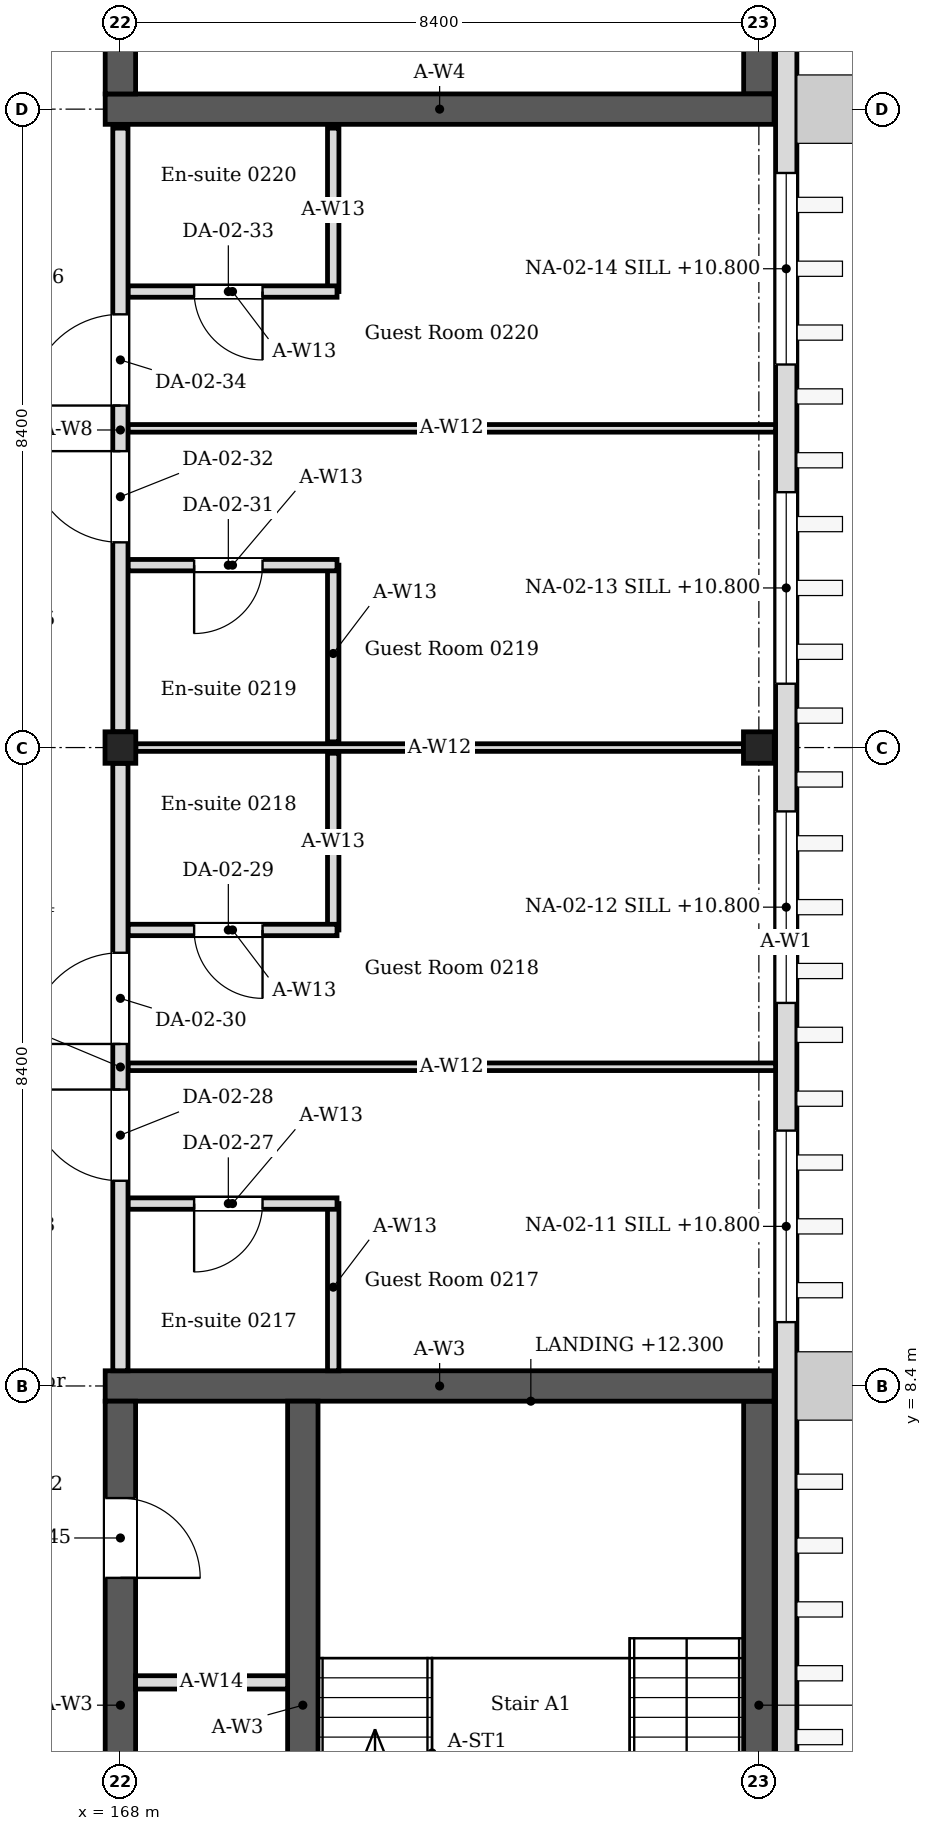
"""IFC4 building model, lengths in metres.
Left out: names, types, materials, properties, quantities, classifications, styles, units other than length and angle.
Written with IfcOpenShell. Run it as: python <this file> out.ifc"""

import sys

from ifc_helpers import new_model, si_unit, direction, frame, frame_2d, origin, origin_2d, place, context, subcontext, project, spatial, rectangle, i_section, extrude, element, fill, save


model = new_model("IFC4")
c1 = context("Model", 3, precision=1e-05, world=origin(), true_north=direction((0.0, 1.0)))
c2 = subcontext(c1, "Body", "Model", "MODEL_VIEW")
j1 = project(units=[si_unit("LENGTHUNIT", "METRE"), si_unit("PLANEANGLEUNIT", "RADIAN")], contexts=[c1])
p1 = place(None, origin())
s1 = spatial("IfcSite", under=j1, at=p1, CompositionType="ELEMENT")
p2 = place(p1, origin())
s2 = spatial("IfcBuilding", under=s1, at=p2, CompositionType="ELEMENT")
p3 = place(p2, frame((0.0, 0.0, 10.2)))
s3 = spatial("IfcBuildingStorey", under=s2, at=p3, CompositionType="ELEMENT", Elevation=10.2)
for number, where, z_axis, x_axis in (
    (1, (168.0, 16.8, 0.0), (0.0, 0.0, 1.0), (1.0, 0.0, 0.0)),
    (2, (176.4, 16.8, 0.0), (0.0, 0.0, 1.0), (1.0, 0.0, 0.0)),
):
    element("IfcColumn", number, at=place(p3, frame(where, z_axis=z_axis, x_axis=x_axis)), inside=s3, PredefinedType="COLUMN", context=c2, shape_type="SweptSolid", body=[
        extrude(i_section(OverallWidth=0.405, OverallDepth=0.414, WebThickness=0.018, FlangeThickness=0.028, FilletRadius=0.022, at=origin_2d()), origin(), (0.0, 0.0, 1.0), 4.2),
    ])
p4 = place(p3, frame((167.8, 8.4, 0.0), z_axis=(0.0, 0.0, 1.0), x_axis=(1.0, 0.0, 0.0)))
e3 = element("IfcWall", 3, at=p4, inside=s3, PredefinedType="SOLIDWALL", context=c2, shape_type="SweptSolid", body=[
    extrude(rectangle(XDim=8.8, YDim=0.4, at=frame_2d((4.4, 0.0))), origin(), (0.0, 0.0, 1.0), 4.05),
])
p5 = place(p3, frame((168.0, 0.2, 0.0), z_axis=(0.0, 0.0, 1.0), x_axis=(0.0, 1.0, 0.0)))
e4 = element("IfcWall", 4, at=p5, inside=s3, PredefinedType="SOLIDWALL", context=c2, shape_type="SweptSolid", body=[
    extrude(rectangle(XDim=8.0, YDim=0.4, at=frame_2d((4.0, 0.0))), origin(), (0.0, 0.0, 1.0), 4.05),
])
p6 = place(p5, frame((1.75, 0.0, 0.0)))
e5 = element("IfcOpeningElement", 5, at=p6, cuts=e4, PredefinedType="OPENING", context=c2, shape_type="SweptSolid", body=[
    extrude(rectangle(XDim=1.0, YDim=2.1, at=frame_2d((0.5, 1.05))), frame((0.0, 0.21, 0.0), z_axis=(0.0, -1.0, 0.0), x_axis=(1.0, 0.0, 0.0)), (0.0, 0.0, 1.0), 0.42),
])
p7 = place(p5, frame((5.675, 0.0, 0.0)))
e6 = element("IfcOpeningElement", 6, at=p7, cuts=e4, PredefinedType="OPENING", context=c2, shape_type="SweptSolid", body=[
    extrude(rectangle(XDim=1.05, YDim=2.1, at=frame_2d((0.525, 1.05))), frame((0.0, 0.21, 0.0), z_axis=(0.0, -1.0, 0.0), x_axis=(1.0, 0.0, 0.0)), (0.0, 0.0, 1.0), 0.42),
])
p8 = place(p3, frame((176.4, 0.2, 0.0), z_axis=(0.0, 0.0, 1.0), x_axis=(0.0, 1.0, 0.0)))
e7 = element("IfcWall", 7, at=p8, inside=s3, PredefinedType="SOLIDWALL", context=c2, shape_type="SweptSolid", body=[
    extrude(rectangle(XDim=8.0, YDim=0.4, at=frame_2d((4.0, 0.0))), origin(), (0.0, 0.0, 1.0), 4.05),
])
p9 = place(p3, frame((167.8, 25.2, 0.0), z_axis=(0.0, 0.0, 1.0), x_axis=(1.0, 0.0, 0.0)))
e8 = element("IfcWall", 8, at=p9, inside=s3, PredefinedType="SOLIDWALL", context=c2, shape_type="SweptSolid", body=[
    extrude(rectangle(XDim=8.8, YDim=0.4, at=frame_2d((4.4, 0.0))), origin(), (0.0, 0.0, 1.0), 4.05),
])
p10 = place(p3, frame((168.0, 25.4, 0.0), z_axis=(0.0, 0.0, 1.0), x_axis=(0.0, 1.0, 0.0)))
e9 = element("IfcWall", 9, at=p10, inside=s3, PredefinedType="SOLIDWALL", context=c2, shape_type="SweptSolid", body=[
    extrude(rectangle(XDim=16.4, YDim=0.4, at=frame_2d((8.2, 0.0))), origin(), (0.0, 0.0, 1.0), 4.05),
])
p11 = place(p10, frame((1.0, 0.0, 0.0)))
e10 = element("IfcOpeningElement", 10, at=p11, cuts=e9, PredefinedType="OPENING", context=c2, shape_type="SweptSolid", body=[
    extrude(rectangle(XDim=1.0, YDim=2.1, at=frame_2d((0.5, 1.05))), frame((0.0, 0.21, 0.0), z_axis=(0.0, -1.0, 0.0), x_axis=(1.0, 0.0, 0.0)), (0.0, 0.0, 1.0), 0.42),
])
p12 = place(p10, frame((14.4, 0.0, 0.0)))
e11 = element("IfcOpeningElement", 11, at=p12, cuts=e9, PredefinedType="OPENING", context=c2, shape_type="SweptSolid", body=[
    extrude(rectangle(XDim=1.4, YDim=2.1, at=frame_2d((0.7, 1.05))), frame((0.0, 0.21, 0.0), z_axis=(0.0, -1.0, 0.0), x_axis=(1.0, 0.0, 0.0)), (0.0, 0.0, 1.0), 0.42),
])
p13 = place(p3, frame((176.4, 25.4, 0.0), z_axis=(0.0, 0.0, 1.0), x_axis=(0.0, 1.0, 0.0)))
e12 = element("IfcWall", 12, at=p13, inside=s3, PredefinedType="SOLIDWALL", context=c2, shape_type="SweptSolid", body=[
    extrude(rectangle(XDim=16.4, YDim=0.4, at=frame_2d((8.2, 0.0))), origin(), (0.0, 0.0, 1.0), 4.05),
])
p14 = place(p3, frame((176.76, -0.22, 0.0), z_axis=(0.0, 0.0, 1.0), x_axis=(0.0, 1.0, 0.0)))
e13 = element("IfcWall", 13, at=p14, inside=s3, PredefinedType="SOLIDWALL", context=c2, shape_type="SweptSolid", body=[
    extrude(rectangle(XDim=42.57, YDim=0.28, at=frame_2d((21.285, 0.0))), origin(), (0.0, 0.0, 1.0), 4.05),
])
p15 = place(p14, frame((9.46, 0.0, 0.6)))
e14 = element("IfcOpeningElement", 14, at=p15, cuts=e13, PredefinedType="OPENING", context=c2, shape_type="SweptSolid", body=[
    extrude(rectangle(XDim=2.52, YDim=2.4, at=frame_2d((1.26, 1.2))), frame((0.0, 0.15, 0.0), z_axis=(0.0, -1.0, 0.0), x_axis=(1.0, 0.0, 0.0)), (0.0, 0.0, 1.0), 0.3),
])
p16 = place(p14, frame((13.66, 0.0, 0.6)))
e15 = element("IfcOpeningElement", 15, at=p16, cuts=e13, PredefinedType="OPENING", context=c2, shape_type="SweptSolid", body=[
    extrude(rectangle(XDim=2.52, YDim=2.4, at=frame_2d((1.26, 1.2))), frame((0.0, 0.15, 0.0), z_axis=(0.0, -1.0, 0.0), x_axis=(1.0, 0.0, 0.0)), (0.0, 0.0, 1.0), 0.3),
])
p17 = place(p14, frame((17.86, 0.0, 0.6)))
e16 = element("IfcOpeningElement", 16, at=p17, cuts=e13, PredefinedType="OPENING", context=c2, shape_type="SweptSolid", body=[
    extrude(rectangle(XDim=2.52, YDim=2.4, at=frame_2d((1.26, 1.2))), frame((0.0, 0.15, 0.0), z_axis=(0.0, -1.0, 0.0), x_axis=(1.0, 0.0, 0.0)), (0.0, 0.0, 1.0), 0.3),
])
p18 = place(p14, frame((22.06, 0.0, 0.6)))
e17 = element("IfcOpeningElement", 17, at=p18, cuts=e13, PredefinedType="OPENING", context=c2, shape_type="SweptSolid", body=[
    extrude(rectangle(XDim=2.52, YDim=2.4, at=frame_2d((1.26, 1.2))), frame((0.0, 0.15, 0.0), z_axis=(0.0, -1.0, 0.0), x_axis=(1.0, 0.0, 0.0)), (0.0, 0.0, 1.0), 0.3),
])
p19 = place(p3, frame((170.8, 8.6, 0.0), z_axis=(0.0, 0.0, 1.0), x_axis=(0.0, 1.0, 0.0)))
e18 = element("IfcWall", 18, at=p19, inside=s3, PredefinedType="PARTITIONING", context=c2, shape_type="SweptSolid", body=[
    extrude(rectangle(XDim=2.2, YDim=0.15, at=frame_2d((1.1, 0.0))), origin(), (0.0, 0.0, 1.0), 4.05),
])
p20 = place(p3, frame((170.85, 10.8, 0.0), z_axis=(0.0, 0.0, 1.0), x_axis=(-1.0, 0.0, 0.0)))
e19 = element("IfcWall", 19, at=p20, inside=s3, PredefinedType="PARTITIONING", context=c2, shape_type="SweptSolid", body=[
    extrude(rectangle(XDim=2.75, YDim=0.15, at=frame_2d((1.375, 0.0))), origin(), (0.0, 0.0, 1.0), 4.05),
])
p21 = place(p20, frame((0.98, 0.0, 0.0)))
e20 = element("IfcOpeningElement", 20, at=p21, cuts=e19, PredefinedType="OPENING", context=c2, shape_type="SweptSolid", body=[
    extrude(rectangle(XDim=0.9, YDim=2.1, at=frame_2d((0.45, 1.05))), frame((0.0, 0.085, 0.0), z_axis=(0.0, -1.0, 0.0), x_axis=(1.0, 0.0, 0.0)), (0.0, 0.0, 1.0), 0.17),
])
p22 = place(p3, frame((170.8, 14.4, 0.0), z_axis=(0.0, 0.0, 1.0), x_axis=(0.0, 1.0, 0.0)))
e21 = element("IfcWall", 21, at=p22, inside=s3, PredefinedType="PARTITIONING", context=c2, shape_type="SweptSolid", body=[
    extrude(rectangle(XDim=2.325, YDim=0.15, at=frame_2d((1.163, 0.0))), origin(), (0.0, 0.0, 1.0), 4.05),
])
p23 = place(p3, frame((170.85, 14.4, 0.0), z_axis=(0.0, 0.0, 1.0), x_axis=(-1.0, 0.0, 0.0)))
e22 = element("IfcWall", 22, at=p23, inside=s3, PredefinedType="PARTITIONING", context=c2, shape_type="SweptSolid", body=[
    extrude(rectangle(XDim=2.75, YDim=0.15, at=frame_2d((1.375, 0.0))), origin(), (0.0, 0.0, 1.0), 4.05),
])
p24 = place(p23, frame((0.98, 0.0, 0.0)))
e23 = element("IfcOpeningElement", 23, at=p24, cuts=e22, PredefinedType="OPENING", context=c2, shape_type="SweptSolid", body=[
    extrude(rectangle(XDim=0.9, YDim=2.1, at=frame_2d((0.45, 1.05))), frame((0.0, 0.085, 0.0), z_axis=(0.0, -1.0, 0.0), x_axis=(1.0, 0.0, 0.0)), (0.0, 0.0, 1.0), 0.17),
])
p25 = place(p3, frame((170.8, 16.875, 0.0), z_axis=(0.0, 0.0, 1.0), x_axis=(0.0, 1.0, 0.0)))
e24 = element("IfcWall", 24, at=p25, inside=s3, PredefinedType="PARTITIONING", context=c2, shape_type="SweptSolid", body=[
    extrude(rectangle(XDim=2.325, YDim=0.15, at=frame_2d((1.163, 0.0))), origin(), (0.0, 0.0, 1.0), 4.05),
])
p26 = place(p3, frame((170.85, 19.2, 0.0), z_axis=(0.0, 0.0, 1.0), x_axis=(-1.0, 0.0, 0.0)))
e25 = element("IfcWall", 25, at=p26, inside=s3, PredefinedType="PARTITIONING", context=c2, shape_type="SweptSolid", body=[
    extrude(rectangle(XDim=2.75, YDim=0.15, at=frame_2d((1.375, 0.0))), origin(), (0.0, 0.0, 1.0), 4.05),
])
p27 = place(p26, frame((0.98, 0.0, 0.0)))
e26 = element("IfcOpeningElement", 26, at=p27, cuts=e25, PredefinedType="OPENING", context=c2, shape_type="SweptSolid", body=[
    extrude(rectangle(XDim=0.9, YDim=2.1, at=frame_2d((0.45, 1.05))), frame((0.0, 0.085, 0.0), z_axis=(0.0, -1.0, 0.0), x_axis=(1.0, 0.0, 0.0)), (0.0, 0.0, 1.0), 0.17),
])
p28 = place(p3, frame((170.8, 22.8, 0.0), z_axis=(0.0, 0.0, 1.0), x_axis=(0.0, 1.0, 0.0)))
e27 = element("IfcWall", 27, at=p28, inside=s3, PredefinedType="PARTITIONING", context=c2, shape_type="SweptSolid", body=[
    extrude(rectangle(XDim=2.15, YDim=0.15, at=frame_2d((1.075, 0.0))), origin(), (0.0, 0.0, 1.0), 4.05),
])
p29 = place(p3, frame((170.85, 22.8, 0.0), z_axis=(0.0, 0.0, 1.0), x_axis=(-1.0, 0.0, 0.0)))
e28 = element("IfcWall", 28, at=p29, inside=s3, PredefinedType="PARTITIONING", context=c2, shape_type="SweptSolid", body=[
    extrude(rectangle(XDim=2.75, YDim=0.15, at=frame_2d((1.375, 0.0))), origin(), (0.0, 0.0, 1.0), 4.05),
])
p30 = place(p29, frame((0.98, 0.0, 0.0)))
e29 = element("IfcOpeningElement", 29, at=p30, cuts=e28, PredefinedType="OPENING", context=c2, shape_type="SweptSolid", body=[
    extrude(rectangle(XDim=0.9, YDim=2.1, at=frame_2d((0.45, 1.05))), frame((0.0, 0.085, 0.0), z_axis=(0.0, -1.0, 0.0), x_axis=(1.0, 0.0, 0.0)), (0.0, 0.0, 1.0), 0.17),
])
p31 = place(p3, frame((168.202, 16.8, 0.0), z_axis=(0.0, 0.0, 1.0), x_axis=(1.0, 0.0, 0.0)))
e30 = element("IfcWall", 30, at=p31, inside=s3, PredefinedType="PARTITIONING", context=c2, shape_type="SweptSolid", body=[
    extrude(rectangle(XDim=7.995, YDim=0.1, at=frame_2d((3.998, 0.0))), origin(), (0.0, 0.0, 1.0), 3.604),
])
for number, where, z_axis, x_axis in (
    (31, (168.1, 12.6, 0.0), (0.0, 0.0, 1.0), (1.0, 0.0, 0.0)),
    (32, (168.1, 21.0, 0.0), (0.0, 0.0, 1.0), (1.0, 0.0, 0.0)),
):
    element("IfcWall", number, at=place(p3, frame(where, z_axis=z_axis, x_axis=x_axis)), inside=s3, PredefinedType="PARTITIONING", context=c2, shape_type="SweptSolid", body=[
        extrude(rectangle(XDim=8.52, YDim=0.1, at=frame_2d((4.26, 0.0))), origin(), (0.0, 0.0, 1.0), 3.604),
    ])
p32 = place(p3, frame((168.0, 8.6, 0.0), z_axis=(0.0, 0.0, 1.0), x_axis=(0.0, 1.0, 0.0)))
e33 = element("IfcWall", 33, at=p32, inside=s3, PredefinedType="PARTITIONING", context=c2, shape_type="SweptSolid", body=[
    extrude(rectangle(XDim=7.993, YDim=0.2, at=frame_2d((3.997, 0.0))), origin(), (0.0, 0.0, 1.0), 3.45),
])
p33 = place(p32, frame((2.5, 0.0, 0.0)))
e34 = element("IfcOpeningElement", 34, at=p33, cuts=e33, PredefinedType="OPENING", context=c2, shape_type="SweptSolid", body=[
    extrude(rectangle(XDim=1.2, YDim=2.1, at=frame_2d((0.6, 1.05))), frame((0.0, 0.11, 0.0), z_axis=(0.0, -1.0, 0.0), x_axis=(1.0, 0.0, 0.0)), (0.0, 0.0, 1.0), 0.22),
])
p34 = place(p32, frame((4.3, 0.0, 0.0)))
e35 = element("IfcOpeningElement", 35, at=p34, cuts=e33, PredefinedType="OPENING", context=c2, shape_type="SweptSolid", body=[
    extrude(rectangle(XDim=1.2, YDim=2.1, at=frame_2d((0.6, 1.05))), frame((0.0, 0.11, 0.0), z_axis=(0.0, -1.0, 0.0), x_axis=(1.0, 0.0, 0.0)), (0.0, 0.0, 1.0), 0.22),
])
p35 = place(p3, frame((168.0, 17.007, 0.0), z_axis=(0.0, 0.0, 1.0), x_axis=(0.0, 1.0, 0.0)))
e36 = element("IfcWall", 36, at=p35, inside=s3, PredefinedType="PARTITIONING", context=c2, shape_type="SweptSolid", body=[
    extrude(rectangle(XDim=7.943, YDim=0.2, at=frame_2d((3.971, 0.0))), origin(), (0.0, 0.0, 1.0), 3.45),
])
p36 = place(p35, frame((2.493, 0.0, 0.0)))
e37 = element("IfcOpeningElement", 37, at=p36, cuts=e36, PredefinedType="OPENING", context=c2, shape_type="SweptSolid", body=[
    extrude(rectangle(XDim=1.2, YDim=2.1, at=frame_2d((0.6, 1.05))), frame((0.0, 0.11, 0.0), z_axis=(0.0, -1.0, 0.0), x_axis=(1.0, 0.0, 0.0)), (0.0, 0.0, 1.0), 0.22),
])
p37 = place(p35, frame((4.293, 0.0, 0.0)))
e38 = element("IfcOpeningElement", 38, at=p37, cuts=e36, PredefinedType="OPENING", context=c2, shape_type="SweptSolid", body=[
    extrude(rectangle(XDim=1.2, YDim=2.1, at=frame_2d((0.6, 1.05))), frame((0.0, 0.11, 0.0), z_axis=(0.0, -1.0, 0.0), x_axis=(1.0, 0.0, 0.0)), (0.0, 0.0, 1.0), 0.22),
])
p38 = place(p3, frame((170.4, 0.2, 0.0), z_axis=(0.0, 0.0, 1.0), x_axis=(0.0, 1.0, 0.0)))
e39 = element("IfcWall", 39, at=p38, inside=s3, PredefinedType="SOLIDWALL", context=c2, shape_type="SweptSolid", body=[
    extrude(rectangle(XDim=8.0, YDim=0.4, at=frame_2d((4.0, 0.0))), origin(), (0.0, 0.0, 1.0), 4.05),
])
p39 = place(p38, frame((0.3, 0.0, 0.0)))
e40 = element("IfcOpeningElement", 40, at=p39, cuts=e39, PredefinedType="OPENING", context=c2, shape_type="SweptSolid", body=[
    extrude(rectangle(XDim=0.9, YDim=2.1, at=frame_2d((0.45, 1.05))), frame((0.0, 0.21, 0.0), z_axis=(0.0, -1.0, 0.0), x_axis=(1.0, 0.0, 0.0)), (0.0, 0.0, 1.0), 0.42),
])
p40 = place(p3, frame((168.2, 4.5, 0.0), z_axis=(0.0, 0.0, 1.0), x_axis=(1.0, 0.0, 0.0)))
e41 = element("IfcWall", 41, at=p40, inside=s3, PredefinedType="PARTITIONING", context=c2, shape_type="SweptSolid", body=[
    extrude(rectangle(XDim=2.0, YDim=0.175, at=frame_2d((1.0, 0.0))), origin(), (0.0, 0.0, 1.0), 4.05),
])
p41 = place(p15, origin())
e42 = element("IfcWindow", 42, at=p41, inside=s3, PartitioningType="SINGLE_PANEL", PredefinedType="WINDOW", context=c2, shape_type="SweptSolid", body=[
    extrude(rectangle(XDim=2.52, YDim=2.4, at=frame_2d((1.26, 1.2))), frame((0.0, 0.03, 0.0), z_axis=(0.0, -1.0, 0.0), x_axis=(1.0, 0.0, 0.0)), (0.0, 0.0, 1.0), 0.06),
])
fill(e14, e42)
p42 = place(p16, origin())
e43 = element("IfcWindow", 43, at=p42, inside=s3, PartitioningType="SINGLE_PANEL", PredefinedType="WINDOW", context=c2, shape_type="SweptSolid", body=[
    extrude(rectangle(XDim=2.52, YDim=2.4, at=frame_2d((1.26, 1.2))), frame((0.0, 0.03, 0.0), z_axis=(0.0, -1.0, 0.0), x_axis=(1.0, 0.0, 0.0)), (0.0, 0.0, 1.0), 0.06),
])
fill(e15, e43)
p43 = place(p17, origin())
e44 = element("IfcWindow", 44, at=p43, inside=s3, PartitioningType="SINGLE_PANEL", PredefinedType="WINDOW", context=c2, shape_type="SweptSolid", body=[
    extrude(rectangle(XDim=2.52, YDim=2.4, at=frame_2d((1.26, 1.2))), frame((0.0, 0.03, 0.0), z_axis=(0.0, -1.0, 0.0), x_axis=(1.0, 0.0, 0.0)), (0.0, 0.0, 1.0), 0.06),
])
fill(e16, e44)
p44 = place(p18, origin())
e45 = element("IfcWindow", 45, at=p44, inside=s3, PartitioningType="SINGLE_PANEL", PredefinedType="WINDOW", context=c2, shape_type="SweptSolid", body=[
    extrude(rectangle(XDim=2.52, YDim=2.4, at=frame_2d((1.26, 1.2))), frame((0.0, 0.03, 0.0), z_axis=(0.0, -1.0, 0.0), x_axis=(1.0, 0.0, 0.0)), (0.0, 0.0, 1.0), 0.06),
])
fill(e17, e45)
p45 = place(p21, origin())
e46 = element("IfcDoor", 46, at=p45, inside=s3, OperationType="SINGLE_SWING_RIGHT", PredefinedType="DOOR", context=c2, shape_type="SweptSolid", body=[
    extrude(rectangle(XDim=0.9, YDim=2.1, at=frame_2d((0.45, 1.05))), frame((0.0, 0.025, 0.0), z_axis=(0.0, -1.0, 0.0), x_axis=(1.0, 0.0, 0.0)), (0.0, 0.0, 1.0), 0.05),
])
fill(e20, e46)
p46 = place(p33, origin())
e47 = element("IfcDoor", 47, at=p46, inside=s3, OperationType="SINGLE_SWING_RIGHT", PredefinedType="DOOR", context=c2, shape_type="SweptSolid", body=[
    extrude(rectangle(XDim=1.2, YDim=2.1, at=frame_2d((0.6, 1.05))), frame((0.0, 0.025, 0.0), z_axis=(0.0, -1.0, 0.0), x_axis=(1.0, 0.0, 0.0)), (0.0, 0.0, 1.0), 0.05),
])
fill(e34, e47)
p47 = place(p24, origin())
e48 = element("IfcDoor", 48, at=p47, inside=s3, OperationType="SINGLE_SWING_LEFT", PredefinedType="DOOR", context=c2, shape_type="SweptSolid", body=[
    extrude(rectangle(XDim=0.9, YDim=2.1, at=frame_2d((0.45, 1.05))), frame((0.0, 0.025, 0.0), z_axis=(0.0, -1.0, 0.0), x_axis=(1.0, 0.0, 0.0)), (0.0, 0.0, 1.0), 0.05),
])
fill(e23, e48)
p48 = place(p34, origin())
e49 = element("IfcDoor", 49, at=p48, inside=s3, OperationType="SINGLE_SWING_LEFT", PredefinedType="DOOR", context=c2, shape_type="SweptSolid", body=[
    extrude(rectangle(XDim=1.2, YDim=2.1, at=frame_2d((0.6, 1.05))), frame((0.0, 0.025, 0.0), z_axis=(0.0, -1.0, 0.0), x_axis=(1.0, 0.0, 0.0)), (0.0, 0.0, 1.0), 0.05),
])
fill(e35, e49)
p49 = place(p27, origin())
e50 = element("IfcDoor", 50, at=p49, inside=s3, OperationType="SINGLE_SWING_RIGHT", PredefinedType="DOOR", context=c2, shape_type="SweptSolid", body=[
    extrude(rectangle(XDim=0.9, YDim=2.1, at=frame_2d((0.45, 1.05))), frame((0.0, 0.025, 0.0), z_axis=(0.0, -1.0, 0.0), x_axis=(1.0, 0.0, 0.0)), (0.0, 0.0, 1.0), 0.05),
])
fill(e26, e50)
p50 = place(p36, origin())
e51 = element("IfcDoor", 51, at=p50, inside=s3, OperationType="SINGLE_SWING_RIGHT", PredefinedType="DOOR", context=c2, shape_type="SweptSolid", body=[
    extrude(rectangle(XDim=1.2, YDim=2.1, at=frame_2d((0.6, 1.05))), frame((0.0, 0.025, 0.0), z_axis=(0.0, -1.0, 0.0), x_axis=(1.0, 0.0, 0.0)), (0.0, 0.0, 1.0), 0.05),
])
fill(e37, e51)
p51 = place(p30, origin())
e52 = element("IfcDoor", 52, at=p51, inside=s3, OperationType="SINGLE_SWING_LEFT", PredefinedType="DOOR", context=c2, shape_type="SweptSolid", body=[
    extrude(rectangle(XDim=0.9, YDim=2.1, at=frame_2d((0.45, 1.05))), frame((0.0, 0.025, 0.0), z_axis=(0.0, -1.0, 0.0), x_axis=(1.0, 0.0, 0.0)), (0.0, 0.0, 1.0), 0.05),
])
fill(e29, e52)
p52 = place(p37, origin())
e53 = element("IfcDoor", 53, at=p52, inside=s3, OperationType="SINGLE_SWING_LEFT", PredefinedType="DOOR", context=c2, shape_type="SweptSolid", body=[
    extrude(rectangle(XDim=1.2, YDim=2.1, at=frame_2d((0.6, 1.05))), frame((0.0, 0.025, 0.0), z_axis=(0.0, -1.0, 0.0), x_axis=(1.0, 0.0, 0.0)), (0.0, 0.0, 1.0), 0.05),
])
fill(e38, e53)
p53 = place(p7, origin())
e54 = element("IfcDoor", 54, at=p53, inside=s3, OperationType="SINGLE_SWING_LEFT", PredefinedType="DOOR", context=c2, shape_type="SweptSolid", body=[
    extrude(rectangle(XDim=1.05, YDim=2.1, at=frame_2d((0.525, 1.05))), frame((0.0, 0.025, 0.0), z_axis=(0.0, -1.0, 0.0), x_axis=(1.0, 0.0, 0.0)), (0.0, 0.0, 1.0), 0.05),
])
fill(e6, e54)
save(model, sys.argv[1])
